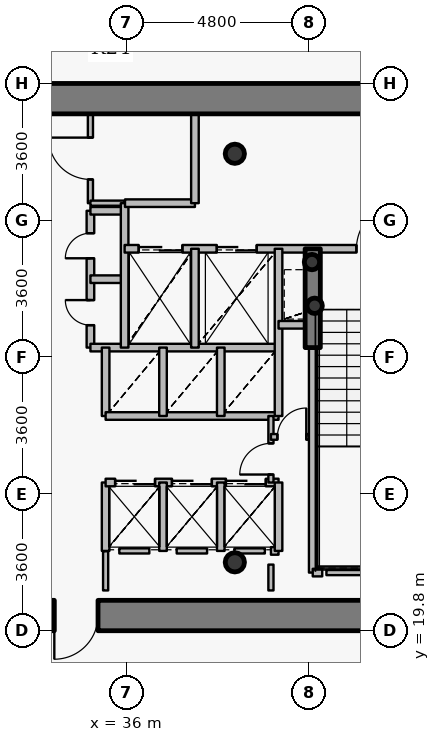
"""IFC4 building model, lengths in metres.
Left out: names, types, materials, properties, quantities, classifications, styles, units other than length and angle.
Written with IfcOpenShell. Run it as: python <this file> out.ifc"""

import sys

from ifc_helpers import new_model, si_unit, direction, frame, frame_2d, origin, origin_2d, place, context, subcontext, project, spatial, rectangle, hollow_circle, extrude, source, transform, mapped, element, fill, save


model = new_model("IFC4")
c1 = context("Model", 3, precision=1e-05, world=origin(), true_north=direction((0.0, 1.0)))
c2 = subcontext(c1, "Body", "Model", "MODEL_VIEW")
j1 = project(units=[si_unit("LENGTHUNIT", "METRE"), si_unit("PLANEANGLEUNIT", "RADIAN")], contexts=[c1])
p1 = place(None, origin())
s1 = spatial("IfcSite", under=j1, at=p1, CompositionType="ELEMENT")
p2 = place(p1, origin())
s2 = spatial("IfcBuilding", under=s1, at=p2, CompositionType="ELEMENT")
p3 = place(p2, frame((0.0, 0.0, 134.7)))
s3 = spatial("IfcBuildingStorey", under=s2, at=p3, CompositionType="ELEMENT", Elevation=134.7)
for number, where, z_axis, x_axis in (
    (1, (38.85, 21.6, 0.0), (0.0, 0.0, 1.0), (1.0, 0.0, 0.0)),
    (2, (38.85, 32.35, 0.0), (0.0, 0.0, 1.0), (1.0, 0.0, 0.0)),
):
    element("IfcColumn", number, at=place(p3, frame(where, z_axis=z_axis, x_axis=x_axis)), inside=s3, PredefinedType="COLUMN", context=c2, shape_type="SweptSolid", body=[
        extrude(hollow_circle(Radius=0.254, WallThickness=0.02, at=origin_2d()), origin(), (0.0, 0.0, 1.0), 3.75),
    ])
for number, where, z_axis, x_axis in (
    (3, (40.95, 28.35, 0.0), (0.0, 0.0, 1.0), (1.0, 0.0, 0.0)),
    (4, (40.88, 29.5, 0.0), (0.0, 0.0, 1.0), (1.0, 0.0, 0.0)),
):
    element("IfcColumn", number, at=place(p3, frame(where, z_axis=z_axis, x_axis=x_axis)), inside=s3, PredefinedType="COLUMN", context=c2, shape_type="SweptSolid", body=[
        extrude(hollow_circle(Radius=0.203, WallThickness=0.016, at=origin_2d()), origin(), (0.0, 0.0, 1.0), 3.75),
    ])
p4 = place(p3, frame((26.6, 33.8, 0.0), z_axis=(0.0, 0.0, 1.0), x_axis=(1.0, 0.0, 0.0)))
e5 = element("IfcWall", 5, at=p4, inside=s3, PredefinedType="SHEAR", context=c2, shape_type="SweptSolid", body=[
    extrude(rectangle(XDim=18.8, YDim=0.8, at=frame_2d((9.4, 0.0))), origin(), (0.0, 0.0, 1.0), 2.95),
])
p5 = place(p3, frame((45.4, 20.2, 0.0), z_axis=(0.0, 0.0, 1.0), x_axis=(-1.0, 0.0, 0.0)))
e6 = element("IfcWall", 6, at=p5, inside=s3, PredefinedType="SHEAR", context=c2, shape_type="SweptSolid", body=[
    extrude(rectangle(XDim=18.8, YDim=0.8, at=frame_2d((9.4, 0.0))), origin(), (0.0, 0.0, 1.0), 2.95),
])
p6 = place(p5, frame((10.15, 0.0, 0.0)))
e7 = element("IfcOpeningElement", 7, at=p6, cuts=e6, PredefinedType="OPENING", context=c2, shape_type="SweptSolid", body=[
    extrude(rectangle(XDim=1.15, YDim=2.15, at=origin_2d()), frame((0.575, 0.41, 1.075), z_axis=(0.0, -1.0, 0.0), x_axis=(1.0, 0.0, 0.0)), (0.0, 0.0, 1.0), 0.82),
])
p7 = place(p3, frame((40.9, 27.25, 0.0), z_axis=(0.0, 0.0, 1.0), x_axis=(0.0, 1.0, 0.0)))
e8 = element("IfcWall", 8, at=p7, inside=s3, PredefinedType="SHEAR", context=c2, shape_type="SweptSolid", body=[
    extrude(rectangle(XDim=2.6, YDim=0.4, at=frame_2d((1.3, 0.0))), origin(), (0.0, 0.0, 1.0), 3.1),
])
p8 = place(p3, frame((35.05, 27.25, 0.0), z_axis=(0.0, 0.0, 1.0), x_axis=(0.0, 1.0, 0.0)))
e9 = element("IfcWall", 9, at=p8, inside=s3, PredefinedType="PARTITIONING", context=c2, shape_type="SweptSolid", body=[
    extrude(rectangle(XDim=3.6, YDim=0.2, at=frame_2d((1.8, 0.0))), origin(), (0.0, 0.0, 1.0), 3.5),
])
p9 = place(p8, frame((0.59, 0.0, 0.0)))
e10 = element("IfcOpeningElement", 10, at=p9, cuts=e9, PredefinedType="OPENING", context=c2, shape_type="SweptSolid", body=[
    extrude(rectangle(XDim=0.66, YDim=2.05, at=origin_2d()), frame((0.33, 0.11, 1.025), z_axis=(0.0, -1.0, 0.0), x_axis=(1.0, 0.0, 0.0)), (0.0, 0.0, 1.0), 0.22),
])
p10 = place(p8, frame((2.35, 0.0, 0.0)))
e11 = element("IfcOpeningElement", 11, at=p10, cuts=e9, PredefinedType="OPENING", context=c2, shape_type="SweptSolid", body=[
    extrude(rectangle(XDim=0.66, YDim=2.05, at=origin_2d()), frame((0.33, 0.11, 1.025), z_axis=(0.0, -1.0, 0.0), x_axis=(1.0, 0.0, 0.0)), (0.0, 0.0, 1.0), 0.22),
])
p11 = place(p3, frame((35.05, 27.25, 0.0), z_axis=(0.0, 0.0, 1.0), x_axis=(1.0, 0.0, 0.0)))
e12 = element("IfcWall", 12, at=p11, inside=s3, PredefinedType="PARTITIONING", context=c2, shape_type="SweptSolid", body=[
    extrude(rectangle(XDim=4.95, YDim=0.2, at=frame_2d((2.475, 0.0))), origin(), (0.0, 0.0, 1.0), 3.085),
])
for number, where, z_axis, x_axis in (
    (13, (35.05, 29.05, 0.0), (0.0, 0.0, 1.0), (1.0, 0.0, 0.0)),
    (14, (35.05, 30.85, 0.0), (0.0, 0.0, 1.0), (1.0, 0.0, 0.0)),
):
    element("IfcWall", number, at=place(p3, frame(where, z_axis=z_axis, x_axis=x_axis)), inside=s3, PredefinedType="PARTITIONING", context=c2, shape_type="SweptSolid", body=[
        extrude(rectangle(XDim=0.9, YDim=0.2, at=frame_2d((0.45, 0.0))), origin(), (0.0, 0.0, 1.0), 3.5),
    ])
p12 = place(p3, frame((35.05, 31.05, 0.0), z_axis=(0.0, 0.0, 1.0), x_axis=(0.0, 1.0, 0.0)))
e15 = element("IfcWall", 15, at=p12, inside=s3, PredefinedType="PARTITIONING", context=c2, shape_type="SweptSolid", body=[
    extrude(rectangle(XDim=2.35, YDim=0.135, at=frame_2d((1.175, 0.0))), origin(), (0.0, 0.0, 1.0), 3.085),
])
p13 = place(p12, frame((0.625, 0.0, 0.0)))
e16 = element("IfcOpeningElement", 16, at=p13, cuts=e15, PredefinedType="OPENING", context=c2, shape_type="SweptSolid", body=[
    extrude(rectangle(XDim=1.1, YDim=2.15, at=origin_2d()), frame((0.55, 0.078, 1.075), z_axis=(0.0, -1.0, 0.0), x_axis=(1.0, 0.0, 0.0)), (0.0, 0.0, 1.0), 0.155),
])
p14 = place(p3, frame((35.05, 31.05, 0.0), z_axis=(0.0, 0.0, 1.0), x_axis=(1.0, 0.0, 0.0)))
e17 = element("IfcWall", 17, at=p14, inside=s3, PredefinedType="PARTITIONING", context=c2, shape_type="SweptSolid", body=[
    extrude(rectangle(XDim=0.9, YDim=0.135, at=frame_2d((0.45, 0.0))), origin(), (0.0, 0.0, 1.0), 3.5),
])
p15 = place(p3, frame((35.45, 21.9, 0.0), z_axis=(0.0, 0.0, 1.0), x_axis=(0.0, 1.0, 0.0)))
e18 = element("IfcWall", 18, at=p15, inside=s3, PredefinedType="PARTITIONING", context=c2, shape_type="SweptSolid", body=[
    extrude(rectangle(XDim=1.8, YDim=0.2, at=frame_2d((0.9, 0.0))), origin(), (0.0, 0.0, 1.0), 3.5),
])
p16 = place(p3, frame((35.45, 23.7, 0.0), z_axis=(0.0, 0.0, 1.0), x_axis=(1.0, 0.0, 0.0)))
e19 = element("IfcWall", 19, at=p16, inside=s3, PredefinedType="PARTITIONING", context=c2, shape_type="SweptSolid", body=[
    extrude(rectangle(XDim=4.55, YDim=0.2, at=frame_2d((2.275, 0.0))), origin(), (0.0, 0.0, 1.0), 3.085),
])
p17 = place(p16, frame((0.25, 0.0, 0.0)))
e20 = element("IfcOpeningElement", 20, at=p17, cuts=e19, PredefinedType="OPENING", context=c2, shape_type="SweptSolid", body=[
    extrude(rectangle(XDim=1.05, YDim=2.15, at=origin_2d()), frame((0.525, 0.11, 1.075), z_axis=(0.0, -1.0, 0.0), x_axis=(1.0, 0.0, 0.0)), (0.0, 0.0, 1.0), 0.22),
])
p18 = place(p16, frame((1.745, 0.0, 0.0)))
e21 = element("IfcOpeningElement", 21, at=p18, cuts=e19, PredefinedType="OPENING", context=c2, shape_type="SweptSolid", body=[
    extrude(rectangle(XDim=1.05, YDim=2.15, at=origin_2d()), frame((0.525, 0.11, 1.075), z_axis=(0.0, -1.0, 0.0), x_axis=(1.0, 0.0, 0.0)), (0.0, 0.0, 1.0), 0.22),
])
p19 = place(p16, frame((3.165, 0.0, 0.0)))
e22 = element("IfcOpeningElement", 22, at=p19, cuts=e19, PredefinedType="OPENING", context=c2, shape_type="SweptSolid", body=[
    extrude(rectangle(XDim=1.05, YDim=2.15, at=origin_2d()), frame((0.525, 0.11, 1.075), z_axis=(0.0, -1.0, 0.0), x_axis=(1.0, 0.0, 0.0)), (0.0, 0.0, 1.0), 0.22),
])
p20 = place(p3, frame((35.45, 25.45, 0.0), z_axis=(0.0, 0.0, 1.0), x_axis=(0.0, 1.0, 0.0)))
e23 = element("IfcWall", 23, at=p20, inside=s3, PredefinedType="PARTITIONING", context=c2, shape_type="SweptSolid", body=[
    extrude(rectangle(XDim=1.8, YDim=0.2, at=frame_2d((0.9, 0.0))), origin(), (0.0, 0.0, 1.0), 3.5),
])
p21 = place(p3, frame((35.45, 25.45, 0.0), z_axis=(0.0, 0.0, 1.0), x_axis=(1.0, 0.0, 0.0)))
e24 = element("IfcWall", 24, at=p21, inside=s3, PredefinedType="PARTITIONING", context=c2, shape_type="SweptSolid", body=[
    extrude(rectangle(XDim=4.55, YDim=0.2, at=frame_2d((2.275, 0.0))), origin(), (0.0, 0.0, 1.0), 3.085),
])
p22 = place(p3, frame((35.95, 27.25, 0.0), z_axis=(0.0, 0.0, 1.0), x_axis=(0.0, 1.0, 0.0)))
e25 = element("IfcWall", 25, at=p22, inside=s3, PredefinedType="PARTITIONING", context=c2, shape_type="SweptSolid", body=[
    extrude(rectangle(XDim=3.8, YDim=0.2, at=frame_2d((1.9, 0.0))), origin(), (0.0, 0.0, 1.0), 3.5),
])
p23 = place(p3, frame((35.95, 29.85, 0.0), z_axis=(0.0, 0.0, 1.0), x_axis=(1.0, 0.0, 0.0)))
e26 = element("IfcWall", 26, at=p23, inside=s3, PredefinedType="PARTITIONING", context=c2, shape_type="SweptSolid", body=[
    extrude(rectangle(XDim=8.49, YDim=0.2, at=frame_2d((4.245, 0.0))), origin(), (0.0, 0.0, 1.0), 3.085),
])
p24 = place(p23, frame((6.1, 0.0, 0.0)))
e27 = element("IfcOpeningElement", 27, at=p24, cuts=e26, PredefinedType="OPENING", context=c2, shape_type="SweptSolid", body=[
    extrude(rectangle(XDim=1.2, YDim=2.15, at=origin_2d()), frame((0.6, 0.11, 1.075), z_axis=(0.0, -1.0, 0.0), x_axis=(1.0, 0.0, 0.0)), (0.0, 0.0, 1.0), 0.22),
])
p25 = place(p23, frame((0.37, 0.0, 0.0)))
e28 = element("IfcOpeningElement", 28, at=p25, cuts=e26, PredefinedType="OPENING", context=c2, shape_type="SweptSolid", body=[
    extrude(rectangle(XDim=1.15, YDim=2.15, at=origin_2d()), frame((0.575, 0.11, 1.075), z_axis=(0.0, -1.0, 0.0), x_axis=(1.0, 0.0, 0.0)), (0.0, 0.0, 1.0), 0.22),
])
p26 = place(p23, frame((2.425, 0.0, 0.0)))
e29 = element("IfcOpeningElement", 29, at=p26, cuts=e26, PredefinedType="OPENING", context=c2, shape_type="SweptSolid", body=[
    extrude(rectangle(XDim=1.05, YDim=2.15, at=origin_2d()), frame((0.525, 0.11, 1.075), z_axis=(0.0, -1.0, 0.0), x_axis=(1.0, 0.0, 0.0)), (0.0, 0.0, 1.0), 0.22),
])
p27 = place(p3, frame((35.96, 31.05, 0.0), z_axis=(0.0, 0.0, 1.0), x_axis=(1.0, 0.0, 0.0)))
e30 = element("IfcWall", 30, at=p27, inside=s3, PredefinedType="PARTITIONING", context=c2, shape_type="SweptSolid", body=[
    extrude(rectangle(XDim=1.84, YDim=0.2, at=frame_2d((0.92, 0.0))), origin(), (0.0, 0.0, 1.0), 3.5),
])
for number, where, z_axis, x_axis in (
    (31, (36.96, 21.9, 0.0), (0.0, 0.0, 1.0), (0.0, 1.0, 0.0)),
    (32, (36.96, 25.45, 0.0), (0.0, 0.0, 1.0), (0.0, 1.0, 0.0)),
):
    element("IfcWall", number, at=place(p3, frame(where, z_axis=z_axis, x_axis=x_axis)), inside=s3, PredefinedType="PARTITIONING", context=c2, shape_type="SweptSolid", body=[
        extrude(rectangle(XDim=1.8, YDim=0.2, at=frame_2d((0.9, 0.0))), origin(), (0.0, 0.0, 1.0), 3.5),
    ])
p28 = place(p3, frame((37.8, 27.25, 0.0), z_axis=(0.0, 0.0, 1.0), x_axis=(0.0, 1.0, 0.0)))
e33 = element("IfcWall", 33, at=p28, inside=s3, PredefinedType="PARTITIONING", context=c2, shape_type="SweptSolid", body=[
    extrude(rectangle(XDim=2.6, YDim=0.2, at=frame_2d((1.3, 0.0))), origin(), (0.0, 0.0, 1.0), 3.5),
])
p29 = place(p3, frame((37.8, 31.05, 0.0), z_axis=(0.0, 0.0, 1.0), x_axis=(0.0, 1.0, 0.0)))
e34 = element("IfcWall", 34, at=p29, inside=s3, PredefinedType="PARTITIONING", context=c2, shape_type="SweptSolid", body=[
    extrude(rectangle(XDim=2.35, YDim=0.2, at=frame_2d((1.175, 0.0))), origin(), (0.0, 0.0, 1.0), 3.085),
])
for number, where, z_axis, x_axis in (
    (35, (38.48, 21.9, 0.0), (0.0, 0.0, 1.0), (0.0, 1.0, 0.0)),
    (36, (38.48, 25.45, 0.0), (0.0, 0.0, 1.0), (0.0, 1.0, 0.0)),
):
    element("IfcWall", number, at=place(p3, frame(where, z_axis=z_axis, x_axis=x_axis)), inside=s3, PredefinedType="PARTITIONING", context=c2, shape_type="SweptSolid", body=[
        extrude(rectangle(XDim=1.8, YDim=0.2, at=frame_2d((0.9, 0.0))), origin(), (0.0, 0.0, 1.0), 3.5),
    ])
p30 = place(p3, frame((39.8, 21.9, 0.0), z_axis=(0.0, 0.0, 1.0), x_axis=(1.0, 0.0, 0.0)))
e37 = element("IfcWall", 37, at=p30, inside=s3, PredefinedType="PARTITIONING", context=c2, shape_type="SweptSolid", body=[
    extrude(rectangle(XDim=0.2, YDim=0.2, at=frame_2d((0.1, 0.0))), origin(), (0.0, 0.0, 1.0), 3.5),
])
p31 = place(p3, frame((39.8, 23.7, 0.0), z_axis=(0.0, 0.0, 1.0), x_axis=(0.0, 1.0, 0.0)))
e38 = element("IfcWall", 38, at=p31, inside=s3, PredefinedType="PARTITIONING", context=c2, shape_type="SweptSolid", body=[
    extrude(rectangle(XDim=1.75, YDim=0.135, at=frame_2d((0.875, 0.0))), origin(), (0.0, 0.0, 1.0), 3.5),
])
p32 = place(p31, frame((0.21, 0.0, 0.0)))
e39 = element("IfcOpeningElement", 39, at=p32, cuts=e38, PredefinedType="OPENING", context=c2, shape_type="SweptSolid", body=[
    extrude(rectangle(XDim=0.82, YDim=2.1, at=origin_2d()), frame((0.41, 0.078, 1.05), z_axis=(0.0, -1.0, 0.0), x_axis=(1.0, 0.0, 0.0)), (0.0, 0.0, 1.0), 0.155),
])
p33 = place(p3, frame((39.8, 24.9, 0.0), z_axis=(0.0, 0.0, 1.0), x_axis=(1.0, 0.0, 0.0)))
e40 = element("IfcWall", 40, at=p33, inside=s3, PredefinedType="PARTITIONING", context=c2, shape_type="SweptSolid", body=[
    extrude(rectangle(XDim=1.1, YDim=0.15, at=frame_2d((0.55, 0.0))), origin(), (0.0, 0.0, 1.0), 3.5),
])
p34 = place(p33, frame((0.17, 0.0, 0.0)))
e41 = element("IfcOpeningElement", 41, at=p34, cuts=e40, PredefinedType="OPENING", context=c2, shape_type="SweptSolid", body=[
    extrude(rectangle(XDim=0.76, YDim=2.1, at=origin_2d()), frame((0.38, 0.085, 1.05), z_axis=(0.0, -1.0, 0.0), x_axis=(1.0, 0.0, 0.0)), (0.0, 0.0, 1.0), 0.17),
])
p35 = place(p3, frame((40.0, 21.9, 0.0), z_axis=(0.0, 0.0, 1.0), x_axis=(0.0, 1.0, 0.0)))
e42 = element("IfcWall", 42, at=p35, inside=s3, PredefinedType="PARTITIONING", context=c2, shape_type="SweptSolid", body=[
    extrude(rectangle(XDim=1.8, YDim=0.2, at=frame_2d((0.9, 0.0))), origin(), (0.0, 0.0, 1.0), 3.5),
])
p36 = place(p3, frame((40.0, 25.45, 0.0), z_axis=(0.0, 0.0, 1.0), x_axis=(0.0, 1.0, 0.0)))
e43 = element("IfcWall", 43, at=p36, inside=s3, PredefinedType="PARTITIONING", context=c2, shape_type="SweptSolid", body=[
    extrude(rectangle(XDim=4.4, YDim=0.2, at=frame_2d((2.2, 0.0))), origin(), (0.0, 0.0, 1.0), 3.5),
])
p37 = place(p3, frame((40.0, 27.85, 0.0), z_axis=(0.0, 0.0, 1.0), x_axis=(1.0, 0.0, 0.0)))
e44 = element("IfcWall", 44, at=p37, inside=s3, PredefinedType="PARTITIONING", context=c2, shape_type="SweptSolid", body=[
    extrude(rectangle(XDim=0.9, YDim=0.2, at=frame_2d((0.45, 0.0))), origin(), (0.0, 0.0, 1.0), 3.5),
])
p38 = place(p3, frame((40.9, 21.33, 0.0), z_axis=(0.0, 0.0, 1.0), x_axis=(0.0, 1.0, 0.0)))
e45 = element("IfcWall", 45, at=p38, inside=s3, PredefinedType="PARTITIONING", context=c2, shape_type="SweptSolid", body=[
    extrude(rectangle(XDim=5.91, YDim=0.2, at=frame_2d((2.955, 0.0))), origin(), (0.0, 0.0, 1.0), 3.035),
])
p39 = place(p3, frame((40.9, 21.33, 0.0), z_axis=(0.0, 0.0, 1.0), x_axis=(1.0, 0.0, 0.0)))
e46 = element("IfcWall", 46, at=p39, inside=s3, PredefinedType="PARTITIONING", context=c2, shape_type="SweptSolid", body=[
    extrude(rectangle(XDim=0.25, YDim=0.2, at=frame_2d((0.125, 0.0))), origin(), (0.0, 0.0, 1.0), 3.035),
])
p40 = place(p3, frame((44.08, 21.33, 0.0), z_axis=(0.0, 0.0, 1.0), x_axis=(-1.0, 0.0, 0.0)))
e47 = element("IfcWall", 47, at=p40, inside=s3, PredefinedType="PARTITIONING", context=c2, shape_type="SweptSolid", body=[
    extrude(rectangle(XDim=2.82, YDim=0.135, at=frame_2d((1.41, 0.0))), origin(), (0.0, 0.0, 1.0), 3.035),
])
p41 = place(p3, frame((36.6, 21.9, 0.0), z_axis=(0.0, 0.0, 1.0), x_axis=(-1.0, 0.0, 0.0)))
e48 = element("IfcWall", 48, at=p41, inside=s3, PredefinedType="PARTITIONING", context=c2, shape_type="SweptSolid", body=[
    extrude(rectangle(XDim=0.79, YDim=0.135, at=frame_2d((0.395, 0.0))), origin(), (0.0, 0.0, 1.0), 3.5),
])
p42 = place(p3, frame((38.12, 21.9, 0.0), z_axis=(0.0, 0.0, 1.0), x_axis=(-1.0, 0.0, 0.0)))
e49 = element("IfcWall", 49, at=p42, inside=s3, PredefinedType="PARTITIONING", context=c2, shape_type="SweptSolid", body=[
    extrude(rectangle(XDim=0.8, YDim=0.135, at=frame_2d((0.4, 0.0))), origin(), (0.0, 0.0, 1.0), 3.5),
])
p43 = place(p3, frame((39.64, 21.9, 0.0), z_axis=(0.0, 0.0, 1.0), x_axis=(-1.0, 0.0, 0.0)))
e50 = element("IfcWall", 50, at=p43, inside=s3, PredefinedType="PARTITIONING", context=c2, shape_type="SweptSolid", body=[
    extrude(rectangle(XDim=0.8, YDim=0.135, at=frame_2d((0.4, 0.0))), origin(), (0.0, 0.0, 1.0), 3.085),
])
p44 = place(p3, frame((39.8, 20.86, 0.0), z_axis=(0.0, 0.0, 1.0), x_axis=(0.0, 1.0, 0.0)))
e51 = element("IfcWall", 51, at=p44, inside=s3, PredefinedType="PARTITIONING", context=c2, shape_type="SweptSolid", body=[
    extrude(rectangle(XDim=0.68, YDim=0.135, at=frame_2d((0.34, 0.0))), origin(), (0.0, 0.0, 1.0), 3.035),
])
p45 = place(p3, frame((35.45, 21.89, 0.0), z_axis=(0.0, 0.0, 1.0), x_axis=(0.0, -1.0, 0.0)))
e52 = element("IfcWall", 52, at=p45, inside=s3, PredefinedType="PARTITIONING", context=c2, shape_type="SweptSolid", body=[
    extrude(rectangle(XDim=1.03, YDim=0.135, at=frame_2d((0.515, 0.0))), origin(), (0.0, 0.0, 1.0), 3.085),
])
m1 = source(origin(), c2, "Body", "SweptSolid", [
    extrude(rectangle(XDim=1.15, YDim=2.15, at=origin_2d()), frame((0.575, 0.025, 1.075), z_axis=(0.0, -1.0, 0.0), x_axis=(1.0, 0.0, 0.0)), (0.0, 0.0, 1.0), 0.05),
])
p46 = place(p6, origin())
e53 = element("IfcDoor", 53, at=p46, inside=s3, OperationType="SINGLE_SWING_RIGHT", PredefinedType="DOOR", context=c2, shape_type="MappedRepresentation", body=[
    mapped(m1, transform((0.0, 0.0, 0.0), x_axis=(1.0, 0.0, 0.0), y_axis=(0.0, 1.0, 0.0), z_axis=(0.0, 0.0, 1.0), scale=1.0)),
])
fill(e7, e53)
m2 = source(origin(), c2, "Body", "SweptSolid", [
    extrude(rectangle(XDim=1.2, YDim=2.15, at=origin_2d()), frame((0.6, 0.025, 1.075), z_axis=(0.0, -1.0, 0.0), x_axis=(1.0, 0.0, 0.0)), (0.0, 0.0, 1.0), 0.05),
])
p47 = place(p24, origin())
e54 = element("IfcDoor", 54, at=p47, inside=s3, OperationType="SINGLE_SWING_RIGHT", PredefinedType="DOOR", context=c2, shape_type="MappedRepresentation", body=[
    mapped(m2, transform((0.0, 0.0, 0.0), x_axis=(1.0, 0.0, 0.0), y_axis=(0.0, 1.0, 0.0), z_axis=(0.0, 0.0, 1.0), scale=1.0)),
])
fill(e27, e54)
m3 = source(origin(), c2, "Body", "SweptSolid", [
    extrude(rectangle(XDim=1.15, YDim=2.15, at=origin_2d()), frame((0.575, 0.025, 1.075), z_axis=(0.0, -1.0, 0.0), x_axis=(1.0, 0.0, 0.0)), (0.0, 0.0, 1.0), 0.05),
])
p48 = place(p25, origin())
e55 = element("IfcDoor", 55, at=p48, inside=s3, OperationType="DOUBLE_DOOR_SLIDING", PredefinedType="USERDEFINED", context=c2, shape_type="MappedRepresentation", body=[
    mapped(m3, transform((0.0, 0.0, 0.0), x_axis=(1.0, 0.0, 0.0), y_axis=(0.0, 1.0, 0.0), z_axis=(0.0, 0.0, 1.0), scale=1.0)),
])
fill(e28, e55)
m4 = source(origin(), c2, "Body", "SweptSolid", [
    extrude(rectangle(XDim=1.05, YDim=2.15, at=origin_2d()), frame((0.525, 0.025, 1.075), z_axis=(0.0, -1.0, 0.0), x_axis=(1.0, 0.0, 0.0)), (0.0, 0.0, 1.0), 0.05),
])
p49 = place(p26, origin())
e56 = element("IfcDoor", 56, at=p49, inside=s3, OperationType="DOUBLE_DOOR_SLIDING", PredefinedType="USERDEFINED", context=c2, shape_type="MappedRepresentation", body=[
    mapped(m4, transform((0.0, 0.0, 0.0), x_axis=(1.0, 0.0, 0.0), y_axis=(0.0, 1.0, 0.0), z_axis=(0.0, 0.0, 1.0), scale=1.0)),
])
fill(e29, e56)
p50 = place(p17, origin())
e57 = element("IfcDoor", 57, at=p50, inside=s3, OperationType="DOUBLE_DOOR_SLIDING", PredefinedType="USERDEFINED", context=c2, shape_type="MappedRepresentation", body=[
    mapped(m4, transform((0.0, 0.0, 0.0), x_axis=(1.0, 0.0, 0.0), y_axis=(0.0, 1.0, 0.0), z_axis=(0.0, 0.0, 1.0), scale=1.0)),
])
fill(e20, e57)
p51 = place(p18, origin())
e58 = element("IfcDoor", 58, at=p51, inside=s3, OperationType="DOUBLE_DOOR_SLIDING", PredefinedType="USERDEFINED", context=c2, shape_type="MappedRepresentation", body=[
    mapped(m4, transform((0.0, 0.0, 0.0), x_axis=(1.0, 0.0, 0.0), y_axis=(0.0, 1.0, 0.0), z_axis=(0.0, 0.0, 1.0), scale=1.0)),
])
fill(e21, e58)
p52 = place(p19, origin())
e59 = element("IfcDoor", 59, at=p52, inside=s3, OperationType="DOUBLE_DOOR_SLIDING", PredefinedType="USERDEFINED", context=c2, shape_type="MappedRepresentation", body=[
    mapped(m4, transform((0.0, 0.0, 0.0), x_axis=(1.0, 0.0, 0.0), y_axis=(0.0, 1.0, 0.0), z_axis=(0.0, 0.0, 1.0), scale=1.0)),
])
fill(e22, e59)
m5 = source(origin(), c2, "Body", "SweptSolid", [
    extrude(rectangle(XDim=0.66, YDim=2.05, at=origin_2d()), frame((0.33, 0.025, 1.025), z_axis=(0.0, -1.0, 0.0), x_axis=(1.0, 0.0, 0.0)), (0.0, 0.0, 1.0), 0.05),
])
p53 = place(p9, origin())
e60 = element("IfcDoor", 60, at=p53, inside=s3, OperationType="SINGLE_SWING_RIGHT", PredefinedType="USERDEFINED", context=c2, shape_type="MappedRepresentation", body=[
    mapped(m5, transform((0.0, 0.0, 0.0), x_axis=(1.0, 0.0, 0.0), y_axis=(0.0, 1.0, 0.0), z_axis=(0.0, 0.0, 1.0), scale=1.0)),
])
fill(e10, e60)
p54 = place(p10, origin())
e61 = element("IfcDoor", 61, at=p54, inside=s3, OperationType="SINGLE_SWING_LEFT", PredefinedType="USERDEFINED", context=c2, shape_type="MappedRepresentation", body=[
    mapped(m5, transform((0.0, 0.0, 0.0), x_axis=(1.0, 0.0, 0.0), y_axis=(0.0, 1.0, 0.0), z_axis=(0.0, 0.0, 1.0), scale=1.0)),
])
fill(e11, e61)
m6 = source(origin(), c2, "Body", "SweptSolid", [
    extrude(rectangle(XDim=1.1, YDim=2.15, at=origin_2d()), frame((0.55, 0.025, 1.075), z_axis=(0.0, -1.0, 0.0), x_axis=(1.0, 0.0, 0.0)), (0.0, 0.0, 1.0), 0.05),
])
p55 = place(p13, origin())
e62 = element("IfcDoor", 62, at=p55, inside=s3, OperationType="SINGLE_SWING_RIGHT", PredefinedType="DOOR", context=c2, shape_type="MappedRepresentation", body=[
    mapped(m6, transform((0.0, 0.0, 0.0), x_axis=(1.0, 0.0, 0.0), y_axis=(0.0, 1.0, 0.0), z_axis=(0.0, 0.0, 1.0), scale=1.0)),
])
fill(e16, e62)
m7 = source(origin(), c2, "Body", "SweptSolid", [
    extrude(rectangle(XDim=0.82, YDim=2.1, at=origin_2d()), frame((0.41, 0.025, 1.05), z_axis=(0.0, -1.0, 0.0), x_axis=(1.0, 0.0, 0.0)), (0.0, 0.0, 1.0), 0.05),
])
p56 = place(p32, origin())
e63 = element("IfcDoor", 63, at=p56, inside=s3, OperationType="SINGLE_SWING_LEFT", PredefinedType="DOOR", context=c2, shape_type="MappedRepresentation", body=[
    mapped(m7, transform((0.0, 0.0, 0.0), x_axis=(1.0, 0.0, 0.0), y_axis=(0.0, 1.0, 0.0), z_axis=(0.0, 0.0, 1.0), scale=1.0)),
])
fill(e39, e63)
m8 = source(origin(), c2, "Body", "SweptSolid", [
    extrude(rectangle(XDim=0.76, YDim=2.1, at=origin_2d()), frame((0.38, 0.025, 1.05), z_axis=(0.0, -1.0, 0.0), x_axis=(1.0, 0.0, 0.0)), (0.0, 0.0, 1.0), 0.05),
])
p57 = place(p34, origin())
e64 = element("IfcDoor", 64, at=p57, inside=s3, OperationType="SINGLE_SWING_RIGHT", PredefinedType="DOOR", context=c2, shape_type="MappedRepresentation", body=[
    mapped(m8, transform((0.0, 0.0, 0.0), x_axis=(1.0, 0.0, 0.0), y_axis=(0.0, 1.0, 0.0), z_axis=(0.0, 0.0, 1.0), scale=1.0)),
])
fill(e41, e64)
save(model, sys.argv[1])
